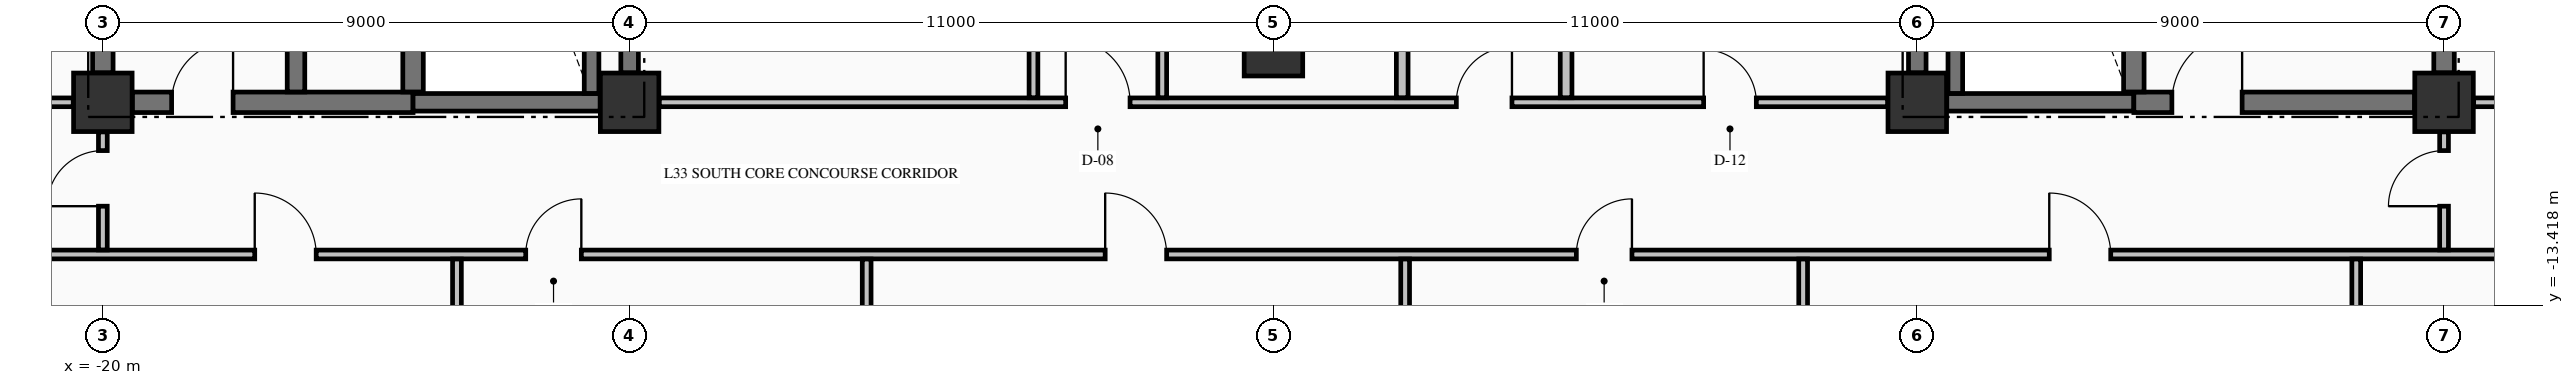
"""IFC4 building model, lengths in metres.
Left out: names, types, materials, properties, quantities, classifications, styles, units other than length and angle.
Written with IfcOpenShell. Run it as: python <this file> out.ifc"""

import sys

from ifc_helpers import new_model, si_unit, direction, frame, frame_2d, origin, origin_2d, place, context, subcontext, project, spatial, rectangle, extrude, element, fill, save


model = new_model("IFC4")
c1 = context("Model", 3, precision=1e-05, world=origin(), true_north=direction((0.0, 1.0)))
c2 = subcontext(c1, "Body", "Model", "MODEL_VIEW")
j1 = project(units=[si_unit("LENGTHUNIT", "METRE"), si_unit("PLANEANGLEUNIT", "RADIAN")], contexts=[c1])
p1 = place(None, origin())
s1 = spatial("IfcSite", under=j1, at=p1, CompositionType="ELEMENT")
p2 = place(p1, origin())
s2 = spatial("IfcBuilding", under=s1, at=p2, CompositionType="ELEMENT")
p3 = place(p2, frame((0.0, 0.0, 132.06)))
s3 = spatial("IfcBuildingStorey", under=s2, at=p3, CompositionType="ELEMENT", Elevation=132.06)
for number, where, z_axis, x_axis in (
    (1, (-20.0, -9.95, -0.25), (0.0, 0.0, 1.0), (1.0, 0.0, 0.0)),
    (2, (-11.0, -9.95, -0.25), (0.0, 0.0, 1.0), (1.0, 0.0, 0.0)),
    (3, (11.0, -9.95, -0.25), (0.0, 0.0, 1.0), (1.0, 0.0, 0.0)),
    (4, (20.0, -9.95, -0.25), (0.0, 0.0, 1.0), (1.0, 0.0, 0.0)),
    (5, (0.0, -9.0, -0.25), (0.0, 0.0, 1.0), (1.0, 0.0, 0.0)),
):
    element("IfcColumn", number, at=place(p3, frame(where, z_axis=z_axis, x_axis=x_axis)), inside=s3, PredefinedType="COLUMN", context=c2, shape_type="SweptSolid", body=[
        extrude(rectangle(XDim=1.0, YDim=1.0, at=origin_2d()), origin(), (0.0, 0.0, 1.0), 3.57),
    ])
p4 = place(p3, frame((-19.496, -9.95, 0.0), z_axis=(0.0, 0.0, 1.0), x_axis=(1.0, 0.0, 0.0)))
e6 = element("IfcWall", 6, at=p4, inside=s3, PredefinedType="SHEAR", context=c2, shape_type="SweptSolid", body=[
    extrude(rectangle(XDim=4.796, YDim=0.35, at=frame_2d((2.398, 0.0))), origin(), (0.0, 0.0, 1.0), 3.32),
])
p5 = place(p4, frame((0.671, 0.0, 0.0)))
e7 = element("IfcOpeningElement", 7, at=p5, cuts=e6, PredefinedType="OPENING", context=c2, shape_type="SweptSolid", body=[
    extrude(rectangle(XDim=1.05, YDim=2.15, at=frame_2d((0.525, 1.075))), frame((0.0, 0.185, 0.0), z_axis=(0.0, -1.0, 0.0), x_axis=(1.0, 0.0, 0.0)), (0.0, 0.0, 1.0), 0.37),
])
for number, where, z_axis, x_axis in (
    (8, (-14.7, -9.95, 0.0), (0.0, 0.0, 1.0), (1.0, 0.0, 0.0)),
    (9, (11.504, -9.95, 0.0), (0.0, 0.0, 1.0), (1.0, 0.0, 0.0)),
):
    element("IfcWall", number, at=place(p3, frame(where, z_axis=z_axis, x_axis=x_axis)), inside=s3, PredefinedType="SHEAR", context=c2, shape_type="SweptSolid", body=[
        extrude(rectangle(XDim=3.196, YDim=0.3, at=frame_2d((1.598, 0.0))), origin(), (0.0, 0.0, 1.0), 3.32),
    ])
p6 = place(p3, frame((14.7, -9.95, 0.0), z_axis=(0.0, 0.0, 1.0), x_axis=(1.0, 0.0, 0.0)))
e10 = element("IfcWall", 10, at=p6, inside=s3, PredefinedType="SHEAR", context=c2, shape_type="SweptSolid", body=[
    extrude(rectangle(XDim=4.796, YDim=0.35, at=frame_2d((2.398, 0.0))), origin(), (0.0, 0.0, 1.0), 3.32),
])
p7 = place(p6, frame((0.65, 0.0, 0.0)))
e11 = element("IfcOpeningElement", 11, at=p7, cuts=e10, PredefinedType="OPENING", context=c2, shape_type="SweptSolid", body=[
    extrude(rectangle(XDim=1.2, YDim=2.15, at=frame_2d((0.6, 1.075))), frame((0.0, 0.185, 0.0), z_axis=(0.0, -1.0, 0.0), x_axis=(1.0, 0.0, 0.0)), (0.0, 0.0, 1.0), 0.37),
])
p8 = place(p3, frame((-27.835, -12.55, 0.0), z_axis=(0.0, 0.0, 1.0), x_axis=(1.0, 0.0, 0.0)))
e12 = element("IfcWall", 12, at=p8, inside=s3, PredefinedType="PARTITIONING", context=c2, shape_type="SweptSolid", body=[
    extrude(rectangle(XDim=50.67, YDim=0.15, at=frame_2d((25.335, 0.0))), origin(), (0.0, 0.0, 1.0), 3.32),
])
p9 = place(p8, frame((10.43, 0.0, 0.0)))
e13 = element("IfcOpeningElement", 13, at=p9, cuts=e12, PredefinedType="OPENING", context=c2, shape_type="SweptSolid", body=[
    extrude(rectangle(XDim=1.05, YDim=2.15, at=frame_2d((0.525, 1.075))), frame((0.0, 0.085, 0.0), z_axis=(0.0, -1.0, 0.0), x_axis=(1.0, 0.0, 0.0)), (0.0, 0.0, 1.0), 0.17),
])
p10 = place(p8, frame((15.06, 0.0, 0.0)))
e14 = element("IfcOpeningElement", 14, at=p10, cuts=e12, PredefinedType="OPENING", context=c2, shape_type="SweptSolid", body=[
    extrude(rectangle(XDim=0.95, YDim=2.15, at=frame_2d((0.475, 1.075))), frame((0.0, 0.085, 0.0), z_axis=(0.0, -1.0, 0.0), x_axis=(1.0, 0.0, 0.0)), (0.0, 0.0, 1.0), 0.17),
])
p11 = place(p8, frame((24.96, 0.0, 0.0)))
e15 = element("IfcOpeningElement", 15, at=p11, cuts=e12, PredefinedType="OPENING", context=c2, shape_type="SweptSolid", body=[
    extrude(rectangle(XDim=1.05, YDim=2.15, at=frame_2d((0.525, 1.075))), frame((0.0, 0.085, 0.0), z_axis=(0.0, -1.0, 0.0), x_axis=(1.0, 0.0, 0.0)), (0.0, 0.0, 1.0), 0.17),
])
p12 = place(p8, frame((33.01, 0.0, 0.0)))
e16 = element("IfcOpeningElement", 16, at=p12, cuts=e12, PredefinedType="OPENING", context=c2, shape_type="SweptSolid", body=[
    extrude(rectangle(XDim=0.95, YDim=2.15, at=frame_2d((0.475, 1.075))), frame((0.0, 0.085, 0.0), z_axis=(0.0, -1.0, 0.0), x_axis=(1.0, 0.0, 0.0)), (0.0, 0.0, 1.0), 0.17),
])
p13 = place(p8, frame((41.09, 0.0, 0.0)))
e17 = element("IfcOpeningElement", 17, at=p13, cuts=e12, PredefinedType="OPENING", context=c2, shape_type="SweptSolid", body=[
    extrude(rectangle(XDim=1.05, YDim=2.15, at=frame_2d((0.525, 1.075))), frame((0.0, 0.085, 0.0), z_axis=(0.0, -1.0, 0.0), x_axis=(1.0, 0.0, 0.0)), (0.0, 0.0, 1.0), 0.17),
])
p14 = place(p3, frame((-27.835, -9.95, 0.0), z_axis=(0.0, 0.0, 1.0), x_axis=(1.0, 0.0, 0.0)))
e18 = element("IfcWall", 18, at=p14, inside=s3, PredefinedType="PARTITIONING", context=c2, shape_type="SweptSolid", body=[
    extrude(rectangle(XDim=7.329, YDim=0.15, at=frame_2d((3.665, 0.0))), origin(), (0.0, 0.0, 1.0), 3.32),
])
p15 = place(p14, frame((3.335, 0.0, 0.0)))
e19 = element("IfcOpeningElement", 19, at=p15, cuts=e18, PredefinedType="OPENING", context=c2, shape_type="SweptSolid", body=[
    extrude(rectangle(XDim=1.0, YDim=2.15, at=frame_2d((0.5, 1.075))), frame((0.0, 0.085, 0.0), z_axis=(0.0, -1.0, 0.0), x_axis=(1.0, 0.0, 0.0)), (0.0, 0.0, 1.0), 0.17),
])
p16 = place(p3, frame((-10.494, -9.95, 0.0), z_axis=(0.0, 0.0, 1.0), x_axis=(1.0, 0.0, 0.0)))
e20 = element("IfcWall", 20, at=p16, inside=s3, PredefinedType="PARTITIONING", context=c2, shape_type="SweptSolid", body=[
    extrude(rectangle(XDim=20.988, YDim=0.15, at=frame_2d((10.494, 0.0))), origin(), (0.0, 0.0, 1.0), 3.32),
])
p17 = place(p16, frame((6.944, 0.0, 0.0)))
e21 = element("IfcOpeningElement", 21, at=p17, cuts=e20, PredefinedType="OPENING", context=c2, shape_type="SweptSolid", body=[
    extrude(rectangle(XDim=1.1, YDim=2.15, at=frame_2d((0.55, 1.075))), frame((0.0, 0.085, 0.0), z_axis=(0.0, -1.0, 0.0), x_axis=(1.0, 0.0, 0.0)), (0.0, 0.0, 1.0), 0.17),
])
p18 = place(p16, frame((13.619, 0.0, 0.0)))
e22 = element("IfcOpeningElement", 22, at=p18, cuts=e20, PredefinedType="OPENING", context=c2, shape_type="SweptSolid", body=[
    extrude(rectangle(XDim=0.95, YDim=2.15, at=frame_2d((0.475, 1.075))), frame((0.0, 0.085, 0.0), z_axis=(0.0, -1.0, 0.0), x_axis=(1.0, 0.0, 0.0)), (0.0, 0.0, 1.0), 0.17),
])
p19 = place(p16, frame((17.844, 0.0, 0.0)))
e23 = element("IfcOpeningElement", 23, at=p19, cuts=e20, PredefinedType="OPENING", context=c2, shape_type="SweptSolid", body=[
    extrude(rectangle(XDim=0.9, YDim=2.15, at=frame_2d((0.45, 1.075))), frame((0.0, 0.085, 0.0), z_axis=(0.0, -1.0, 0.0), x_axis=(1.0, 0.0, 0.0)), (0.0, 0.0, 1.0), 0.17),
])
p20 = place(p3, frame((20.506, -9.95, 0.0), z_axis=(0.0, 0.0, 1.0), x_axis=(1.0, 0.0, 0.0)))
e24 = element("IfcWall", 24, at=p20, inside=s3, PredefinedType="PARTITIONING", context=c2, shape_type="SweptSolid", body=[
    extrude(rectangle(XDim=2.329, YDim=0.15, at=frame_2d((1.165, 0.0))), origin(), (0.0, 0.0, 1.0), 3.32),
])
p21 = place(p20, frame((0.519, 0.0, 0.0)))
e25 = element("IfcOpeningElement", 25, at=p21, cuts=e24, PredefinedType="OPENING", context=c2, shape_type="SweptSolid", body=[
    extrude(rectangle(XDim=0.95, YDim=2.15, at=frame_2d((0.475, 1.075))), frame((0.0, 0.085, 0.0), z_axis=(0.0, -1.0, 0.0), x_axis=(1.0, 0.0, 0.0)), (0.0, 0.0, 1.0), 0.17),
])
p22 = place(p3, frame((-20.0, -9.446, 0.0), z_axis=(0.0, 0.0, 1.0), x_axis=(0.0, 1.0, 0.0)))
e26 = element("IfcWall", 26, at=p22, inside=s3, PredefinedType="SHEAR", context=c2, shape_type="SweptSolid", body=[
    extrude(rectangle(XDim=8.942, YDim=0.35, at=frame_2d((4.471, 0.0))), origin(), (0.0, 0.0, 1.0), 3.32),
])
p23 = place(p3, frame((-16.7, -9.773, 0.0), z_axis=(0.0, 0.0, 1.0), x_axis=(0.0, 1.0, 0.0)))
e27 = element("IfcWall", 27, at=p23, inside=s3, PredefinedType="SHEAR", context=c2, shape_type="SweptSolid", body=[
    extrude(rectangle(XDim=9.371, YDim=0.3, at=frame_2d((4.686, 0.0))), origin(), (0.0, 0.0, 1.0), 3.32),
])
p24 = place(p3, frame((-14.7, -9.773, 0.0), z_axis=(0.0, 0.0, 1.0), x_axis=(0.0, 1.0, 0.0)))
e28 = element("IfcWall", 28, at=p24, inside=s3, PredefinedType="SHEAR", context=c2, shape_type="SweptSolid", body=[
    extrude(rectangle(XDim=9.371, YDim=0.35, at=frame_2d((4.686, 0.0))), origin(), (0.0, 0.0, 1.0), 3.32),
])
p25 = place(p3, frame((-11.65, -9.798, 0.0), z_axis=(0.0, 0.0, 1.0), x_axis=(0.0, 1.0, 0.0)))
e29 = element("IfcWall", 29, at=p25, inside=s3, PredefinedType="SOLIDWALL", context=c2, shape_type="SweptSolid", body=[
    extrude(rectangle(XDim=9.396, YDim=0.25, at=frame_2d((4.698, 0.0))), origin(), (0.0, 0.0, 1.0), 3.32),
])
for number, where, z_axis, x_axis in (
    (30, (-11.0, -9.446, 0.0), (0.0, 0.0, 1.0), (0.0, 1.0, 0.0)),
    (31, (11.0, -9.446, 0.0), (0.0, 0.0, 1.0), (0.0, 1.0, 0.0)),
):
    element("IfcWall", number, at=place(p3, frame(where, z_axis=z_axis, x_axis=x_axis)), inside=s3, PredefinedType="SHEAR", context=c2, shape_type="SweptSolid", body=[
        extrude(rectangle(XDim=8.942, YDim=0.3, at=frame_2d((4.471, 0.0))), origin(), (0.0, 0.0, 1.0), 3.32),
    ])
p26 = place(p3, frame((11.65, -9.798, 0.0), z_axis=(0.0, 0.0, 1.0), x_axis=(0.0, 1.0, 0.0)))
e32 = element("IfcWall", 32, at=p26, inside=s3, PredefinedType="SOLIDWALL", context=c2, shape_type="SweptSolid", body=[
    extrude(rectangle(XDim=9.396, YDim=0.25, at=frame_2d((4.698, 0.0))), origin(), (0.0, 0.0, 1.0), 3.32),
])
p27 = place(p3, frame((14.7, -9.773, 0.0), z_axis=(0.0, 0.0, 1.0), x_axis=(0.0, 1.0, 0.0)))
e33 = element("IfcWall", 33, at=p27, inside=s3, PredefinedType="SHEAR", context=c2, shape_type="SweptSolid", body=[
    extrude(rectangle(XDim=9.371, YDim=0.35, at=frame_2d((4.686, 0.0))), origin(), (0.0, 0.0, 1.0), 3.32),
])
p28 = place(p3, frame((20.0, -9.446, 0.0), z_axis=(0.0, 0.0, 1.0), x_axis=(0.0, 1.0, 0.0)))
e34 = element("IfcWall", 34, at=p28, inside=s3, PredefinedType="SHEAR", context=c2, shape_type="SweptSolid", body=[
    extrude(rectangle(XDim=2.269, YDim=0.35, at=frame_2d((1.135, 0.0))), origin(), (0.0, 0.0, 1.0), 3.32),
])
p29 = place(p3, frame((-20.0, -12.472, 0.0), z_axis=(0.0, 0.0, 1.0), x_axis=(0.0, 1.0, 0.0)))
e35 = element("IfcWall", 35, at=p29, inside=s3, PredefinedType="PARTITIONING", context=c2, shape_type="SweptSolid", body=[
    extrude(rectangle(XDim=2.016, YDim=0.15, at=frame_2d((1.008, 0.0))), origin(), (0.0, 0.0, 1.0), 2.81),
])
p30 = place(p29, frame((0.747, 0.0, 0.0)))
e36 = element("IfcOpeningElement", 36, at=p30, cuts=e35, PredefinedType="OPENING", context=c2, shape_type="SweptSolid", body=[
    extrude(rectangle(XDim=0.95, YDim=2.15, at=frame_2d((0.475, 1.075))), frame((0.0, 0.085, 0.0), z_axis=(0.0, -1.0, 0.0), x_axis=(1.0, 0.0, 0.0)), (0.0, 0.0, 1.0), 0.17),
])
for number, where, z_axis, x_axis in (
    (37, (-13.95, -25.335, 0.0), (0.0, 0.0, 1.0), (0.0, 1.0, 0.0)),
    (38, (-6.95, -25.335, 0.0), (0.0, 0.0, 1.0), (0.0, 1.0, 0.0)),
):
    element("IfcWall", number, at=place(p3, frame(where, z_axis=z_axis, x_axis=x_axis)), inside=s3, PredefinedType="PARTITIONING", context=c2, shape_type="SweptSolid", body=[
        extrude(rectangle(XDim=12.707, YDim=0.15, at=frame_2d((6.354, 0.0))), origin(), (0.0, 0.0, 1.0), 3.32),
    ])
p31 = place(p3, frame((-4.1, -9.872, 0.0), z_axis=(0.0, 0.0, 1.0), x_axis=(0.0, 1.0, 0.0)))
e39 = element("IfcWall", 39, at=p31, inside=s3, PredefinedType="PARTITIONING", context=c2, shape_type="SweptSolid", body=[
    extrude(rectangle(XDim=9.544, YDim=0.15, at=frame_2d((4.772, 0.0))), origin(), (0.0, 0.0, 1.0), 3.32),
])
p32 = place(p3, frame((-1.9, -9.872, 0.0), z_axis=(0.0, 0.0, 1.0), x_axis=(0.0, 1.0, 0.0)))
e40 = element("IfcWall", 40, at=p32, inside=s3, PredefinedType="PARTITIONING", context=c2, shape_type="SweptSolid", body=[
    extrude(rectangle(XDim=4.919, YDim=0.15, at=frame_2d((2.459, 0.0))), origin(), (0.0, 0.0, 1.0), 3.32),
])
p33 = place(p32, frame((2.597, 0.0, 0.0)))
e41 = element("IfcOpeningElement", 41, at=p33, cuts=e40, PredefinedType="OPENING", context=c2, shape_type="SweptSolid", body=[
    extrude(rectangle(XDim=0.95, YDim=2.15, at=frame_2d((0.475, 1.075))), frame((0.0, 0.085, 0.0), z_axis=(0.0, -1.0, 0.0), x_axis=(1.0, 0.0, 0.0)), (0.0, 0.0, 1.0), 0.17),
])
p34 = place(p3, frame((2.2, -9.872, 0.0), z_axis=(0.0, 0.0, 1.0), x_axis=(0.0, 1.0, 0.0)))
e42 = element("IfcWall", 42, at=p34, inside=s3, PredefinedType="PARTITIONING", context=c2, shape_type="SweptSolid", body=[
    extrude(rectangle(XDim=4.919, YDim=0.2, at=frame_2d((2.459, 0.0))), origin(), (0.0, 0.0, 1.0), 3.32),
])
p35 = place(p3, frame((2.25, -25.335, 0.0), z_axis=(0.0, 0.0, 1.0), x_axis=(0.0, 1.0, 0.0)))
e43 = element("IfcWall", 43, at=p35, inside=s3, PredefinedType="PARTITIONING", context=c2, shape_type="SweptSolid", body=[
    extrude(rectangle(XDim=12.707, YDim=0.15, at=frame_2d((6.354, 0.0))), origin(), (0.0, 0.0, 1.0), 3.32),
])
p36 = place(p3, frame((5.0, -9.872, 0.0), z_axis=(0.0, 0.0, 1.0), x_axis=(0.0, 1.0, 0.0)))
e44 = element("IfcWall", 44, at=p36, inside=s3, PredefinedType="PARTITIONING", context=c2, shape_type="SweptSolid", body=[
    extrude(rectangle(XDim=4.919, YDim=0.2, at=frame_2d((2.459, 0.0))), origin(), (0.0, 0.0, 1.0), 3.32),
])
p37 = place(p3, frame((9.05, -25.335, 0.0), z_axis=(0.0, 0.0, 1.0), x_axis=(0.0, 1.0, 0.0)))
e45 = element("IfcWall", 45, at=p37, inside=s3, PredefinedType="PARTITIONING", context=c2, shape_type="SweptSolid", body=[
    extrude(rectangle(XDim=12.707, YDim=0.15, at=frame_2d((6.354, 0.0))), origin(), (0.0, 0.0, 1.0), 3.32),
])
p38 = place(p3, frame((18.5, -20.394, 0.0), z_axis=(0.0, 0.0, 1.0), x_axis=(0.0, 1.0, 0.0)))
e46 = element("IfcWall", 46, at=p38, inside=s3, PredefinedType="PARTITIONING", context=c2, shape_type="SweptSolid", body=[
    extrude(rectangle(XDim=7.766, YDim=0.15, at=frame_2d((3.883, 0.0))), origin(), (0.0, 0.0, 1.0), 3.32),
])
p39 = place(p3, frame((20.0, -12.472, 0.0), z_axis=(0.0, 0.0, 1.0), x_axis=(0.0, 1.0, 0.0)))
e47 = element("IfcWall", 47, at=p39, inside=s3, PredefinedType="PARTITIONING", context=c2, shape_type="SweptSolid", body=[
    extrude(rectangle(XDim=2.016, YDim=0.15, at=frame_2d((1.008, 0.0))), origin(), (0.0, 0.0, 1.0), 2.81),
])
p40 = place(p39, frame((0.747, 0.0, 0.0)))
e48 = element("IfcOpeningElement", 48, at=p40, cuts=e47, PredefinedType="OPENING", context=c2, shape_type="SweptSolid", body=[
    extrude(rectangle(XDim=0.95, YDim=2.15, at=frame_2d((0.475, 1.075))), frame((0.0, 0.085, 0.0), z_axis=(0.0, -1.0, 0.0), x_axis=(1.0, 0.0, 0.0)), (0.0, 0.0, 1.0), 0.17),
])
p41 = place(p5, origin())
e49 = element("IfcDoor", 49, at=p41, inside=s3, OperationType="SINGLE_SWING_RIGHT", PredefinedType="DOOR", context=c2, shape_type="SweptSolid", body=[
    extrude(rectangle(XDim=1.05, YDim=2.15, at=frame_2d((0.525, 1.075))), frame((0.0, 0.025, 0.0), z_axis=(0.0, -1.0, 0.0), x_axis=(1.0, 0.0, 0.0)), (0.0, 0.0, 1.0), 0.05),
])
fill(e7, e49)
p42 = place(p7, origin())
e50 = element("IfcDoor", 50, at=p42, inside=s3, OperationType="SINGLE_SWING_RIGHT", PredefinedType="DOOR", context=c2, shape_type="SweptSolid", body=[
    extrude(rectangle(XDim=1.2, YDim=2.15, at=frame_2d((0.6, 1.075))), frame((0.0, 0.025, 0.0), z_axis=(0.0, -1.0, 0.0), x_axis=(1.0, 0.0, 0.0)), (0.0, 0.0, 1.0), 0.05),
])
fill(e11, e50)
p43 = place(p17, origin())
e51 = element("IfcDoor", 51, at=p43, inside=s3, OperationType="SINGLE_SWING_LEFT", PredefinedType="DOOR", context=c2, shape_type="SweptSolid", body=[
    extrude(rectangle(XDim=1.1, YDim=2.15, at=frame_2d((0.55, 1.075))), frame((0.0, 0.025, 0.0), z_axis=(0.0, -1.0, 0.0), x_axis=(1.0, 0.0, 0.0)), (0.0, 0.0, 1.0), 0.05),
])
fill(e21, e51)
p44 = place(p9, origin())
e52 = element("IfcDoor", 52, at=p44, inside=s3, OperationType="SINGLE_SWING_LEFT", PredefinedType="DOOR", context=c2, shape_type="SweptSolid", body=[
    extrude(rectangle(XDim=1.05, YDim=2.15, at=frame_2d((0.525, 1.075))), frame((0.0, 0.025, 0.0), z_axis=(0.0, -1.0, 0.0), x_axis=(1.0, 0.0, 0.0)), (0.0, 0.0, 1.0), 0.05),
])
fill(e13, e52)
p45 = place(p10, origin())
e53 = element("IfcDoor", 53, at=p45, inside=s3, OperationType="SINGLE_SWING_RIGHT", PredefinedType="DOOR", context=c2, shape_type="SweptSolid", body=[
    extrude(rectangle(XDim=0.95, YDim=2.15, at=frame_2d((0.475, 1.075))), frame((0.0, 0.025, 0.0), z_axis=(0.0, -1.0, 0.0), x_axis=(1.0, 0.0, 0.0)), (0.0, 0.0, 1.0), 0.05),
])
fill(e14, e53)
p46 = place(p11, origin())
e54 = element("IfcDoor", 54, at=p46, inside=s3, OperationType="SINGLE_SWING_LEFT", PredefinedType="DOOR", context=c2, shape_type="SweptSolid", body=[
    extrude(rectangle(XDim=1.05, YDim=2.15, at=frame_2d((0.525, 1.075))), frame((0.0, 0.025, 0.0), z_axis=(0.0, -1.0, 0.0), x_axis=(1.0, 0.0, 0.0)), (0.0, 0.0, 1.0), 0.05),
])
fill(e15, e54)
p47 = place(p12, origin())
e55 = element("IfcDoor", 55, at=p47, inside=s3, OperationType="SINGLE_SWING_RIGHT", PredefinedType="DOOR", context=c2, shape_type="SweptSolid", body=[
    extrude(rectangle(XDim=0.95, YDim=2.15, at=frame_2d((0.475, 1.075))), frame((0.0, 0.025, 0.0), z_axis=(0.0, -1.0, 0.0), x_axis=(1.0, 0.0, 0.0)), (0.0, 0.0, 1.0), 0.05),
])
fill(e16, e55)
p48 = place(p13, origin())
e56 = element("IfcDoor", 56, at=p48, inside=s3, OperationType="SINGLE_SWING_LEFT", PredefinedType="DOOR", context=c2, shape_type="SweptSolid", body=[
    extrude(rectangle(XDim=1.05, YDim=2.15, at=frame_2d((0.525, 1.075))), frame((0.0, 0.025, 0.0), z_axis=(0.0, -1.0, 0.0), x_axis=(1.0, 0.0, 0.0)), (0.0, 0.0, 1.0), 0.05),
])
fill(e17, e56)
p49 = place(p18, origin())
e57 = element("IfcDoor", 57, at=p49, inside=s3, OperationType="SINGLE_SWING_RIGHT", PredefinedType="DOOR", context=c2, shape_type="SweptSolid", body=[
    extrude(rectangle(XDim=0.95, YDim=2.15, at=frame_2d((0.475, 1.075))), frame((0.0, 0.025, 0.0), z_axis=(0.0, -1.0, 0.0), x_axis=(1.0, 0.0, 0.0)), (0.0, 0.0, 1.0), 0.05),
])
fill(e22, e57)
p50 = place(p19, origin())
e58 = element("IfcDoor", 58, at=p50, inside=s3, OperationType="SINGLE_SWING_LEFT", PredefinedType="DOOR", context=c2, shape_type="SweptSolid", body=[
    extrude(rectangle(XDim=0.9, YDim=2.15, at=frame_2d((0.45, 1.075))), frame((0.0, 0.025, 0.0), z_axis=(0.0, -1.0, 0.0), x_axis=(1.0, 0.0, 0.0)), (0.0, 0.0, 1.0), 0.05),
])
fill(e23, e58)
p51 = place(p30, origin())
e59 = element("IfcDoor", 59, at=p51, inside=s3, OperationType="SINGLE_SWING_LEFT", PredefinedType="DOOR", context=c2, shape_type="SweptSolid", body=[
    extrude(rectangle(XDim=0.95, YDim=2.15, at=frame_2d((0.475, 1.075))), frame((0.0, 0.025, 0.0), z_axis=(0.0, -1.0, 0.0), x_axis=(1.0, 0.0, 0.0)), (0.0, 0.0, 1.0), 0.05),
])
fill(e36, e59)
p52 = place(p40, origin())
e60 = element("IfcDoor", 60, at=p52, inside=s3, OperationType="SINGLE_SWING_LEFT", PredefinedType="DOOR", context=c2, shape_type="SweptSolid", body=[
    extrude(rectangle(XDim=0.95, YDim=2.15, at=frame_2d((0.475, 1.075))), frame((0.0, 0.025, 0.0), z_axis=(0.0, -1.0, 0.0), x_axis=(1.0, 0.0, 0.0)), (0.0, 0.0, 1.0), 0.05),
])
fill(e48, e60)
save(model, sys.argv[1])
